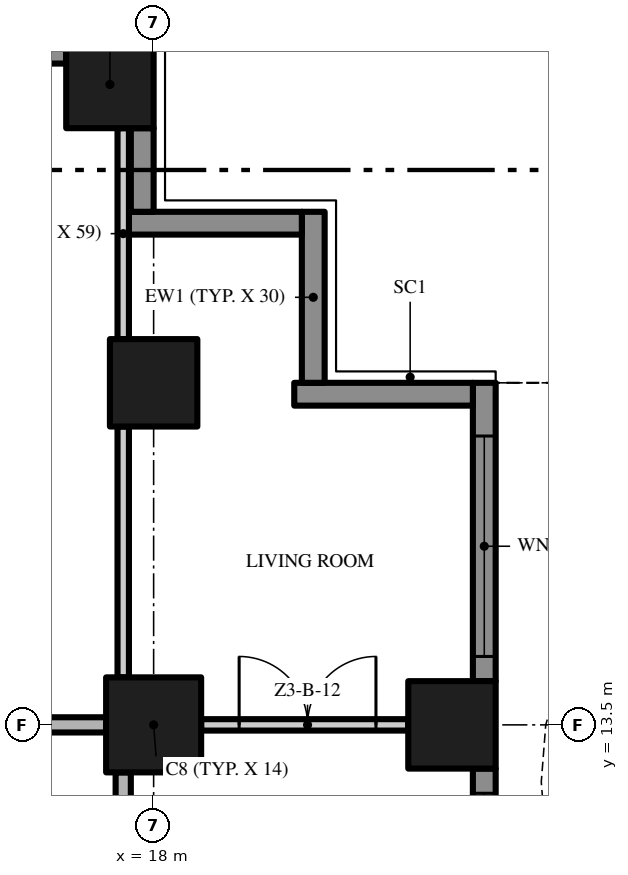
"""IFC4 building model, lengths in metres.
Left out: names, types, materials, properties, quantities, classifications, styles, units other than length and angle.
Written with IfcOpenShell. Run it as: python <this file> out.ifc"""

import sys

from ifc_helpers import new_model, si_unit, direction, frame, frame_2d, origin, origin_2d, place, context, subcontext, project, spatial, polyline, rectangle, outline, extrude, element, fill, save


model = new_model("IFC4")
c1 = context("Model", 3, precision=1e-05, world=origin(), true_north=direction((0.0, 1.0)))
c2 = subcontext(c1, "Body", "Model", "MODEL_VIEW")
j1 = project(units=[si_unit("LENGTHUNIT", "METRE"), si_unit("PLANEANGLEUNIT", "RADIAN")], contexts=[c1])
p1 = place(None, origin())
s1 = spatial("IfcSite", under=j1, at=p1, CompositionType="ELEMENT")
p2 = place(p1, origin())
s2 = spatial("IfcBuilding", under=s1, at=p2, CompositionType="ELEMENT")
p3 = place(p2, frame((0.0, 0.0, 144.0)))
s3 = spatial("IfcBuildingStorey", under=s2, at=p3, CompositionType="ELEMENT", Elevation=144.0)
p4 = place(p3, frame((18.0, 13.5, 0.0), z_axis=(0.0, 0.0, 1.0), x_axis=(1.0, 0.0, 0.0)))
e1 = element("IfcColumn", 1, at=p4, inside=s3, PredefinedType="COLUMN", context=c2, shape_type="SweptSolid", body=[
    extrude(rectangle(XDim=1.25, YDim=1.25, at=origin_2d()), origin(), (0.0, 0.0, 1.0), 3.5),
])
for number, where, z_axis, x_axis in (
    (2, (17.425, 21.925, 0.0), (0.0, 0.0, 1.0), (1.0, 0.0, 0.0)),
    (3, (21.925, 13.5, 0.0), (0.0, 0.0, 1.0), (1.0, 0.0, 0.0)),
    (4, (18.0, 18.0, 0.0), (0.0, 0.0, 1.0), (1.0, 0.0, 0.0)),
):
    element("IfcColumn", number, at=place(p3, frame(where, z_axis=z_axis, x_axis=x_axis)), inside=s3, PredefinedType="COLUMN", context=c2, shape_type="SweptSolid", body=[
        extrude(rectangle(XDim=1.15, YDim=1.15, at=origin_2d()), origin(), (0.0, 0.0, 1.0), 3.5),
    ])
p5 = place(p3, frame((22.35, 12.925, 0.0), z_axis=(0.0, 0.0, 1.0), x_axis=(0.0, -1.0, 0.0)))
e5 = element("IfcWall", 5, at=p5, inside=s3, PredefinedType="SOLIDWALL", context=c2, shape_type="SweptSolid", body=[
    extrude(rectangle(XDim=7.85, YDim=0.3, at=frame_2d((3.925, 0.0))), origin(), (0.0, 0.0, 1.0), 3.5),
])
p6 = place(p5, frame((4.625, 0.0, 0.0)))
e6 = element("IfcOpeningElement", 6, at=p6, cuts=e5, PredefinedType="OPENING", context=c2, shape_type="SweptSolid", body=[
    extrude(rectangle(XDim=2.9, YDim=2.4, at=frame_2d((1.45, 1.2))), frame((0.0, 0.16, 0.0), z_axis=(0.0, -1.0, 0.0), x_axis=(1.0, 0.0, 0.0)), (0.0, 0.0, 1.0), 0.32),
])
p7 = place(p5, frame((0.325, 0.0, 0.45)))
e7 = element("IfcOpeningElement", 7, at=p7, cuts=e5, PredefinedType="OPENING", context=c2, shape_type="SweptSolid", body=[
    extrude(rectangle(XDim=2.9, YDim=2.65, at=frame_2d((1.45, 1.325))), frame((0.0, 0.16, 0.0), z_axis=(0.0, -1.0, 0.0), x_axis=(1.0, 0.0, 0.0)), (0.0, 0.0, 1.0), 0.32),
])
p8 = place(p3, frame((22.35, 18.0, 0.0), z_axis=(0.0, 0.0, 1.0), x_axis=(0.0, -1.0, 0.0)))
e8 = element("IfcWall", 8, at=p8, inside=s3, PredefinedType="SOLIDWALL", context=c2, shape_type="SweptSolid", body=[
    extrude(rectangle(XDim=3.925, YDim=0.3, at=frame_2d((1.962, 0.0))), origin(), (0.0, 0.0, 1.0), 3.5),
])
p9 = place(p8, frame((0.7, 0.0, 0.45)))
e9 = element("IfcOpeningElement", 9, at=p9, cuts=e8, PredefinedType="OPENING", context=c2, shape_type="SweptSolid", body=[
    extrude(rectangle(XDim=2.9, YDim=2.65, at=frame_2d((1.45, 1.325))), frame((0.0, 0.16, 0.0), z_axis=(0.0, -1.0, 0.0), x_axis=(1.0, 0.0, 0.0)), (0.0, 0.0, 1.0), 0.32),
])
p10 = place(p3, frame((19.85, 17.85, 0.0), z_axis=(0.0, 0.0, 1.0), x_axis=(1.0, 0.0, 0.0)))
e10 = element("IfcWall", 10, at=p10, inside=s3, PredefinedType="SOLIDWALL", context=c2, shape_type="SweptSolid", body=[
    extrude(rectangle(XDim=2.35, YDim=0.3, at=frame_2d((1.175, 0.0))), origin(), (0.0, 0.0, 1.0), 3.5),
])
p11 = place(p3, frame((20.1, 20.25, 0.0), z_axis=(0.0, 0.0, 1.0), x_axis=(0.0, -1.0, 0.0)))
e11 = element("IfcWall", 11, at=p11, inside=s3, PredefinedType="SOLIDWALL", context=c2, shape_type="SweptSolid", body=[
    extrude(rectangle(XDim=2.25, YDim=0.3, at=frame_2d((1.125, 0.0))), origin(), (0.0, 0.0, 1.0), 3.5),
])
p12 = place(p3, frame((17.6, 20.1, 0.0), z_axis=(0.0, 0.0, 1.0), x_axis=(1.0, 0.0, 0.0)))
e12 = element("IfcWall", 12, at=p12, inside=s3, PredefinedType="SOLIDWALL", context=c2, shape_type="SweptSolid", body=[
    extrude(rectangle(XDim=2.35, YDim=0.3, at=frame_2d((1.175, 0.0))), origin(), (0.0, 0.0, 1.0), 3.5),
])
p13 = place(p3, frame((17.85, 21.35, 0.0), z_axis=(0.0, 0.0, 1.0), x_axis=(0.0, -1.0, 0.0)))
e13 = element("IfcWall", 13, at=p13, inside=s3, PredefinedType="SOLIDWALL", context=c2, shape_type="SweptSolid", body=[
    extrude(rectangle(XDim=1.1, YDim=0.3, at=frame_2d((0.55, 0.0))), origin(), (0.0, 0.0, 1.0), 3.5),
])
p14 = place(p3, frame((13.5, 22.35, 0.0), z_axis=(0.0, 0.0, 1.0), x_axis=(1.0, 0.0, 0.0)))
e14 = element("IfcWall", 14, at=p14, inside=s3, PredefinedType="SOLIDWALL", context=c2, shape_type="SweptSolid", body=[
    extrude(rectangle(XDim=3.35, YDim=0.3, at=frame_2d((1.675, 0.0))), origin(), (0.0, 0.0, 1.0), 3.5),
])
p15 = place(p14, frame((0.7, 0.0, 0.0)))
e15 = element("IfcOpeningElement", 15, at=p15, cuts=e14, PredefinedType="OPENING", context=c2, shape_type="SweptSolid", body=[
    extrude(rectangle(XDim=2.35, YDim=2.4, at=frame_2d((1.175, 1.2))), frame((0.0, 0.16, 0.0), z_axis=(0.0, -1.0, 0.0), x_axis=(1.0, 0.0, 0.0)), (0.0, 0.0, 1.0), 0.32),
])
p16 = place(p3, origin())
e16 = element("IfcWall", 16, at=p16, inside=s3, PredefinedType="USERDEFINED", context=c2, shape_type="SweptSolid", body=[
    extrude(outline(polyline([(24.3, -13.5), (25.005, -12.0), (25.441, -10.5), (25.5, -9.75), (25.441, -9.0), (25.005, -7.5), (24.3, -6.0), (23.595, -4.5), (23.159, -3.0), (23.1, -2.25), (23.159, -1.5), (23.595, 0.0), (24.3, 1.5), (25.005, 3.0), (25.441, 4.5), (25.5, 5.25), (25.441, 6.0), (25.005, 7.5), (24.3, 9.0), (23.595, 10.5), (23.159, 12.0), (23.1, 12.75), (23.159, 13.5), (23.595, 15.0), (24.3, 16.5), (25.005, 18.0), (24.779, 18.106), (24.074, 16.606), (23.36, 15.089), (22.911, 13.545), (22.849, 12.75), (22.911, 11.955), (23.36, 10.411), (24.074, 8.894), (24.771, 7.411), (25.194, 5.955), (25.249, 5.25), (25.194, 4.545), (24.771, 3.089), (24.074, 1.606), (23.36, 0.089), (22.911, -1.455), (22.849, -2.25), (22.911, -3.045), (23.36, -4.589), (24.074, -6.106), (24.771, -7.589), (25.194, -9.045), (25.249, -9.75), (25.194, -10.455), (24.771, -11.911), (24.074, -13.394), (24.3, -13.5)])), origin(), (0.0, 0.0, 1.0), 0.9),
])
p17 = place(p3, frame((13.5, 13.5, 0.0), z_axis=(0.0, 0.0, 1.0), x_axis=(1.0, 0.0, 0.0)))
e17 = element("IfcWall", 17, at=p17, inside=s3, PredefinedType="PARTITIONING", context=c2, shape_type="SweptSolid", body=[
    extrude(rectangle(XDim=3.875, YDim=0.2, at=frame_2d((1.938, 0.0))), origin(), (0.0, 0.0, 1.0), 3.5),
])
p18 = place(p17, frame((1.6, 0.0, 0.0)))
e18 = element("IfcOpeningElement", 18, at=p18, cuts=e17, PredefinedType="OPENING", context=c2, shape_type="SweptSolid", body=[
    extrude(rectangle(XDim=0.9, YDim=2.1, at=frame_2d((0.45, 1.05))), frame((0.0, 0.11, 0.0), z_axis=(0.0, -1.0, 0.0), x_axis=(1.0, 0.0, 0.0)), (0.0, 0.0, 1.0), 0.22),
])
p19 = place(p3, frame((18.625, 13.5, 0.0), z_axis=(0.0, 0.0, 1.0), x_axis=(1.0, 0.0, 0.0)))
e19 = element("IfcWall", 19, at=p19, inside=s3, PredefinedType="PARTITIONING", context=c2, shape_type="SweptSolid", body=[
    extrude(rectangle(XDim=2.725, YDim=0.15, at=frame_2d((1.363, 0.0))), origin(), (0.0, 0.0, 1.0), 3.5),
])
p20 = place(p19, frame((0.5, 0.0, 0.0)))
e20 = element("IfcOpeningElement", 20, at=p20, cuts=e19, PredefinedType="OPENING", context=c2, shape_type="SweptSolid", body=[
    extrude(rectangle(XDim=1.8, YDim=2.4, at=frame_2d((0.9, 1.2))), frame((0.0, 0.085, 0.0), z_axis=(0.0, -1.0, 0.0), x_axis=(1.0, 0.0, 0.0)), (0.0, 0.0, 1.0), 0.17),
])
p21 = place(p3, frame((17.6, 12.875, 0.0), z_axis=(0.0, 0.0, 1.0), x_axis=(0.0, -1.0, 0.0)))
e21 = element("IfcWall", 21, at=p21, inside=s3, PredefinedType="PARTITIONING", context=c2, shape_type="SweptSolid", body=[
    extrude(rectangle(XDim=7.75, YDim=0.2, at=frame_2d((3.875, 0.0))), origin(), (0.0, 0.0, 1.0), 3.5),
])
p22 = place(p21, frame((5.55, 0.0, 0.0)))
e22 = element("IfcOpeningElement", 22, at=p22, cuts=e21, PredefinedType="OPENING", context=c2, shape_type="SweptSolid", body=[
    extrude(rectangle(XDim=1.2, YDim=2.4, at=frame_2d((0.6, 1.2))), frame((0.0, 0.11, 0.0), z_axis=(0.0, -1.0, 0.0), x_axis=(1.0, 0.0, 0.0)), (0.0, 0.0, 1.0), 0.22),
])
p23 = place(p3, frame((17.6, 14.125, 0.0), z_axis=(0.0, 0.0, 1.0), x_axis=(0.0, 1.0, 0.0)))
e23 = element("IfcWall", 23, at=p23, inside=s3, PredefinedType="PARTITIONING", context=c2, shape_type="SweptSolid", body=[
    extrude(rectangle(XDim=3.3, YDim=0.15, at=frame_2d((1.65, 0.0))), origin(), (0.0, 0.0, 1.0), 3.5),
])
p24 = place(p3, frame((17.6, 18.575, 0.0), z_axis=(0.0, 0.0, 1.0), x_axis=(0.0, 1.0, 0.0)))
e24 = element("IfcWall", 24, at=p24, inside=s3, PredefinedType="PARTITIONING", context=c2, shape_type="SweptSolid", body=[
    extrude(rectangle(XDim=2.775, YDim=0.15, at=frame_2d((1.387, 0.0))), origin(), (0.0, 0.0, 1.0), 3.5),
])
p25 = place(p7, origin())
e25 = element("IfcWindow", 25, at=p25, inside=s3, PartitioningType="SINGLE_PANEL", PredefinedType="WINDOW", context=c2, shape_type="SweptSolid", body=[
    extrude(rectangle(XDim=2.9, YDim=2.65, at=frame_2d((1.45, 1.325))), frame((0.0, 0.03, 0.0), z_axis=(0.0, -1.0, 0.0), x_axis=(1.0, 0.0, 0.0)), (0.0, 0.0, 1.0), 0.06),
])
fill(e7, e25)
p26 = place(p9, origin())
e26 = element("IfcWindow", 26, at=p26, inside=s3, PartitioningType="SINGLE_PANEL", PredefinedType="WINDOW", context=c2, shape_type="SweptSolid", body=[
    extrude(rectangle(XDim=2.9, YDim=2.65, at=frame_2d((1.45, 1.325))), frame((0.0, 0.03, 0.0), z_axis=(0.0, -1.0, 0.0), x_axis=(1.0, 0.0, 0.0)), (0.0, 0.0, 1.0), 0.06),
])
fill(e9, e26)
p27 = place(p20, origin())
e27 = element("IfcDoor", 27, at=p27, inside=s3, OperationType="DOUBLE_DOOR_SINGLE_SWING", PredefinedType="DOOR", context=c2, shape_type="SweptSolid", body=[
    extrude(rectangle(XDim=1.8, YDim=2.4, at=frame_2d((0.9, 1.2))), frame((0.0, 0.025, 0.0), z_axis=(0.0, -1.0, 0.0), x_axis=(1.0, 0.0, 0.0)), (0.0, 0.0, 1.0), 0.05),
])
fill(e20, e27)
save(model, sys.argv[1])
